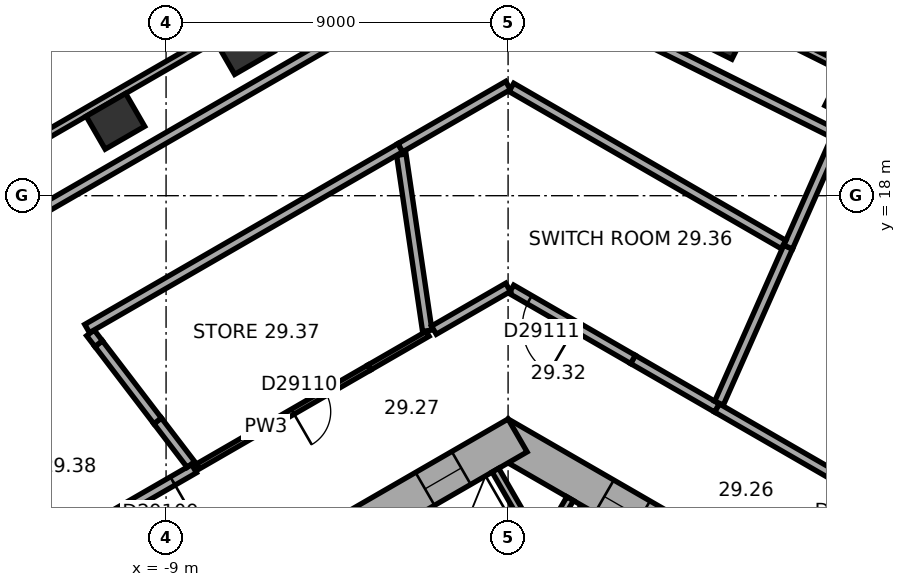
"""IFC4 building model, lengths in metres.
Left out: names, types, materials, properties, quantities, classifications, styles, units other than length and angle.
Written with IfcOpenShell. Run it as: python <this file> out.ifc"""

import sys

from ifc_helpers import new_model, si_unit, direction, frame, frame_2d, origin, origin_2d, place, context, subcontext, project, spatial, rectangle, extrude, element, fill, save


model = new_model("IFC4")
c1 = context("Model", 3, precision=1e-05, world=origin(), true_north=direction((0.0, 1.0)))
c2 = subcontext(c1, "Body", "Model", "MODEL_VIEW")
j1 = project(units=[si_unit("LENGTHUNIT", "METRE"), si_unit("PLANEANGLEUNIT", "RADIAN")], contexts=[c1])
p1 = place(None, origin())
s1 = spatial("IfcSite", under=j1, at=p1, CompositionType="ELEMENT")
p2 = place(p1, origin())
s2 = spatial("IfcBuilding", under=s1, at=p2, CompositionType="ELEMENT")
p3 = place(p2, frame((0.0, 0.0, 119.9)))
s3 = spatial("IfcBuildingStorey", under=s2, at=p3, CompositionType="ELEMENT", Elevation=119.9)
for number, where, z_axis, x_axis in (
    (1, (9.095, 20.551, 0.0), (0.0, 0.0, 1.0), (-0.895, 0.446, 0.0)),
    (2, (5.574, 22.306, 0.0), (0.0, 0.0, 1.0), (-0.895, 0.446, 0.0)),
    (3, (-6.926, 21.925, 0.0), (0.0, 0.0, 1.0), (-0.866, -0.5, 0.0)),
    (4, (-10.333, 19.957, 0.0), (0.0, 0.0, 1.0), (-0.866, -0.5, 0.0)),
):
    element("IfcColumn", number, at=place(p3, frame(where, z_axis=z_axis, x_axis=x_axis)), inside=s3, PredefinedType="COLUMN", context=c2, shape_type="SweptSolid", body=[
        extrude(rectangle(XDim=1.2, YDim=1.0, at=origin_2d()), origin(), (0.0, 0.0, 1.0), 4.5),
    ])
p4 = place(p3, frame((10.25, 5.629, 0.0), z_axis=(0.0, 0.0, 1.0), x_axis=(-0.866022616891, 0.50000482701, 0.0)))
e5 = element("IfcWall", 5, at=p4, inside=s3, PredefinedType="SHEAR", context=c2, shape_type="SweptSolid", body=[
    extrude(rectangle(XDim=12.125, YDim=1.0, at=frame_2d((6.062, 0.0))), origin(), (0.0, 0.0, 1.0), 4.5),
])
p5 = place(p4, frame((2.612, 0.0, 0.0)))
e6 = element("IfcOpeningElement", 6, at=p5, cuts=e5, PredefinedType="OPENING", context=c2, shape_type="SweptSolid", body=[
    extrude(rectangle(XDim=1.1, YDim=2.1, at=frame_2d((0.55, 1.05))), frame((0.0, 0.51, 0.0), z_axis=(0.0, -1.0, 0.0), x_axis=(1.0, 0.0, 0.0)), (0.0, 0.0, 1.0), 1.02),
])
p6 = place(p4, frame((5.212, 0.0, 0.0)))
e7 = element("IfcOpeningElement", 7, at=p6, cuts=e5, PredefinedType="OPENING", context=c2, shape_type="SweptSolid", body=[
    extrude(rectangle(XDim=1.1, YDim=2.1, at=frame_2d((0.55, 1.05))), frame((0.0, 0.51, 0.0), z_axis=(0.0, -1.0, 0.0), x_axis=(1.0, 0.0, 0.0)), (0.0, 0.0, 1.0), 1.02),
])
p7 = place(p4, frame((7.812, 0.0, 0.0)))
e8 = element("IfcOpeningElement", 8, at=p7, cuts=e5, PredefinedType="OPENING", context=c2, shape_type="SweptSolid", body=[
    extrude(rectangle(XDim=1.1, YDim=2.1, at=frame_2d((0.55, 1.05))), frame((0.0, 0.51, 0.0), z_axis=(0.0, -1.0, 0.0), x_axis=(1.0, 0.0, 0.0)), (0.0, 0.0, 1.0), 1.02),
])
p8 = place(p3, frame((0.25, 11.691, 0.0), z_axis=(0.0, 0.0, 1.0), x_axis=(-0.866022616891, -0.50000482701, 0.0)))
e9 = element("IfcWall", 9, at=p8, inside=s3, PredefinedType="SHEAR", context=c2, shape_type="SweptSolid", body=[
    extrude(rectangle(XDim=12.125, YDim=1.0, at=frame_2d((6.062, 0.0))), origin(), (0.0, 0.0, 1.0), 4.5),
])
p9 = place(p8, frame((6.262, 0.0, 0.0)))
e10 = element("IfcOpeningElement", 10, at=p9, cuts=e9, PredefinedType="OPENING", context=c2, shape_type="SweptSolid", body=[
    extrude(rectangle(XDim=1.5, YDim=2.1, at=frame_2d((0.75, 1.05))), frame((0.0, 0.51, 0.0), z_axis=(0.0, -1.0, 0.0), x_axis=(1.0, 0.0, 0.0)), (0.0, 0.0, 1.0), 1.02),
])
p10 = place(p8, frame((1.712, 0.0, 0.0)))
e11 = element("IfcOpeningElement", 11, at=p10, cuts=e9, PredefinedType="OPENING", context=c2, shape_type="SweptSolid", body=[
    extrude(rectangle(XDim=1.1, YDim=2.1, at=frame_2d((0.55, 1.05))), frame((0.0, 0.51, 0.0), z_axis=(0.0, -1.0, 0.0), x_axis=(1.0, 0.0, 0.0)), (0.0, 0.0, 1.0), 1.02),
])
p11 = place(p3, frame((20.63, 15.47, 0.0), z_axis=(0.0, 0.0, 1.0), x_axis=(-0.894934518609, 0.446197498203, 0.0)))
e12 = element("IfcWall", 12, at=p11, inside=s3, PredefinedType="STANDARD", context=c2, shape_type="SweptSolid", body=[
    extrude(rectangle(XDim=21.246, YDim=0.2, at=frame_2d((10.623, 0.0))), origin(), (0.0, 0.0, 1.0), 4.5),
])
p12 = place(p3, frame((-3.136, 24.805, 0.0), z_axis=(0.0, 0.0, 1.0), x_axis=(-0.866028291626, -0.499994998079, 0.0)))
e13 = element("IfcWall", 13, at=p12, inside=s3, PredefinedType="STANDARD", context=c2, shape_type="SweptSolid", body=[
    extrude(rectangle(XDim=21.246, YDim=0.2, at=frame_2d((10.623, 0.0))), origin(), (0.0, 0.0, 1.0), 4.5),
])
p13 = place(p3, frame((0.532, 8.122, 0.0), z_axis=(0.0, 0.0, 1.0), x_axis=(0.500077893725, 0.86598042715, 0.0)))
e14 = element("IfcWall", 14, at=p13, inside=s3, PredefinedType="PARTITIONING", context=c2, shape_type="SweptSolid", body=[
    extrude(rectangle(XDim=2.2, YDim=0.2, at=frame_2d((1.1, 0.0))), origin(), (0.0, 0.0, 1.0), 4.22),
])
p14 = place(p3, frame((0.767, 8.872, 0.0), z_axis=(0.0, 0.0, 1.0), x_axis=(-0.499994660107, 0.866028486751, 0.0)))
e15 = element("IfcWall", 15, at=p14, inside=s3, PredefinedType="PARTITIONING", context=c2, shape_type="SweptSolid", body=[
    extrude(rectangle(XDim=2.2, YDim=0.2, at=frame_2d((1.1, 0.0))), origin(), (0.0, 0.0, 1.0), 4.22),
])
p15 = place(p3, frame((10.186, 9.708, 0.0), z_axis=(0.0, 0.0, 1.0), x_axis=(-0.866018196172, 0.500012483742, 0.0)))
e16 = element("IfcWall", 16, at=p15, inside=s3, PredefinedType="SOLIDWALL", context=c2, shape_type="SweptSolid", body=[
    extrude(rectangle(XDim=5.416, YDim=0.25, at=frame_2d((2.708, 0.0))), origin(), (0.0, 0.0, 1.0), 4.22),
])
p16 = place(p15, frame((0.25, 0.0, 0.0)))
e17 = element("IfcOpeningElement", 17, at=p16, cuts=e16, PredefinedType="OPENING", context=c2, shape_type="SweptSolid", body=[
    extrude(rectangle(XDim=1.4, YDim=2.1, at=frame_2d((0.7, 1.05))), frame((0.0, 0.135, 0.0), z_axis=(0.0, -1.0, 0.0), x_axis=(1.0, 0.0, 0.0)), (0.0, 0.0, 1.0), 0.27),
])
p17 = place(p3, frame((-8.262, 10.818, 0.0), z_axis=(0.0, 0.0, 1.0), x_axis=(-0.866006491466, -0.500032755666, 0.0)))
e18 = element("IfcWall", 18, at=p17, inside=s3, PredefinedType="SOLIDWALL", context=c2, shape_type="SweptSolid", body=[
    extrude(rectangle(XDim=5.948, YDim=0.25, at=frame_2d((2.974, 0.0))), origin(), (0.0, 0.0, 1.0), 4.22),
])
p18 = place(p17, frame((0.65, 0.0, 0.0)))
e19 = element("IfcOpeningElement", 19, at=p18, cuts=e18, PredefinedType="OPENING", context=c2, shape_type="SweptSolid", body=[
    extrude(rectangle(XDim=1.4, YDim=2.1, at=frame_2d((0.7, 1.05))), frame((0.0, 0.135, 0.0), z_axis=(0.0, -1.0, 0.0), x_axis=(1.0, 0.0, 0.0)), (0.0, 0.0, 1.0), 0.27),
])
p19 = place(p3, frame((-8.159, 10.878, 0.0), z_axis=(0.0, 0.0, 1.0), x_axis=(0.866031891337, 0.499988763061, 0.0)))
e20 = element("IfcWall", 20, at=p19, inside=s3, PredefinedType="PARTITIONING", context=c2, shape_type="SweptSolid", body=[
    extrude(rectangle(XDim=4.126, YDim=0.15, at=frame_2d((2.063, 0.0))), origin(), (0.0, 0.0, 1.0), 4.22),
])
p20 = place(p19, frame((2.877, 0.0, 0.0)))
e21 = element("IfcOpeningElement", 21, at=p20, cuts=e20, PredefinedType="OPENING", context=c2, shape_type="SweptSolid", body=[
    extrude(rectangle(XDim=1.0, YDim=2.1, at=frame_2d((0.5, 1.05))), frame((0.0, 0.085, 0.0), z_axis=(0.0, -1.0, 0.0), x_axis=(1.0, 0.0, 0.0)), (0.0, 0.0, 1.0), 0.17),
])
p21 = place(p3, frame((-8.348, 10.929, 0.0), z_axis=(0.0, 0.0, 1.0), x_axis=(-0.606915548717, 0.794766328379, 0.0)))
e22 = element("IfcWall", 22, at=p21, inside=s3, PredefinedType="SOLIDWALL", context=c2, shape_type="SweptSolid", body=[
    extrude(rectangle(XDim=1.441, YDim=0.25, at=frame_2d((0.721, 0.0))), origin(), (0.0, 0.0, 1.0), 3.2),
])
p22 = place(p3, frame((-9.222, 12.075, 0.0), z_axis=(0.0, 0.0, 1.0), x_axis=(-0.607067159329, 0.794650529518, 0.0)))
e23 = element("IfcWall", 23, at=p22, inside=s3, PredefinedType="SOLIDWALL", context=c2, shape_type="SweptSolid", body=[
    extrude(rectangle(XDim=2.556, YDim=0.25, at=frame_2d((1.278, 0.0))), origin(), (0.0, 0.0, 1.0), 3.2),
])
p23 = place(p3, frame((5.495, 12.416, 0.0), z_axis=(0.0, 0.0, 1.0), x_axis=(-0.866043744811, 0.499968231064, 0.0)))
e24 = element("IfcWall", 24, at=p23, inside=s3, PredefinedType="SOLIDWALL", context=c2, shape_type="SweptSolid", body=[
    extrude(rectangle(XDim=2.551, YDim=0.25, at=frame_2d((1.275, 0.0))), origin(), (0.0, 0.0, 1.0), 4.22),
])
p24 = place(p3, frame((-4.585, 12.941, 0.0), z_axis=(0.0, 0.0, 1.0), x_axis=(0.866022692473, 0.500004696101, 0.0)))
e25 = element("IfcWall", 25, at=p24, inside=s3, PredefinedType="PARTITIONING", context=c2, shape_type="SweptSolid", body=[
    extrude(rectangle(XDim=1.073, YDim=0.15, at=frame_2d((0.537, 0.0))), origin(), (0.0, 0.0, 1.0), 4.22),
])
p25 = place(p3, frame((3.286, 13.691, 0.0), z_axis=(0.0, 0.0, 1.0), x_axis=(-0.866013897511, 0.50001992892, 0.0)))
e26 = element("IfcWall", 26, at=p25, inside=s3, PredefinedType="SOLIDWALL", context=c2, shape_type="SweptSolid", body=[
    extrude(rectangle(XDim=3.694, YDim=0.25, at=frame_2d((1.847, 0.0))), origin(), (0.0, 0.0, 1.0), 4.22),
])
p26 = place(p25, frame((1.744, 0.0, 0.0)))
e27 = element("IfcOpeningElement", 27, at=p26, cuts=e26, PredefinedType="OPENING", context=c2, shape_type="SweptSolid", body=[
    extrude(rectangle(XDim=1.4, YDim=2.1, at=frame_2d((0.7, 1.05))), frame((0.0, 0.135, 0.0), z_axis=(0.0, -1.0, 0.0), x_axis=(1.0, 0.0, 0.0)), (0.0, 0.0, 1.0), 0.27),
])
p27 = place(p3, frame((-2.115, 14.367, 0.0), z_axis=(0.0, 0.0, 1.0), x_axis=(-0.866020974757, -0.500007671222, 0.0)))
e28 = element("IfcWall", 28, at=p27, inside=s3, PredefinedType="PARTITIONING", context=c2, shape_type="SweptSolid", body=[
    extrude(rectangle(XDim=1.778, YDim=0.15, at=frame_2d((0.889, 0.0))), origin(), (0.0, 0.0, 1.0), 4.22),
])
p28 = place(p3, frame((-10.991, 14.391, 0.0), z_axis=(0.0, 0.0, 1.0), x_axis=(0.607070265523, -0.794648156556, 0.0)))
e29 = element("IfcWall", 29, at=p28, inside=s3, PredefinedType="SOLIDWALL", context=c2, shape_type="SweptSolid", body=[
    extrude(rectangle(XDim=0.358, YDim=0.25, at=frame_2d((0.179, 0.0))), origin(), (0.0, 0.0, 1.0), 4.22),
])
p29 = place(p3, frame((-2.127, 14.447, 0.0), z_axis=(0.0, 0.0, 1.0), x_axis=(-0.145734161627, 0.989323786298, 0.0)))
e30 = element("IfcWall", 30, at=p29, inside=s3, PredefinedType="SOLIDWALL", context=c2, shape_type="SweptSolid", body=[
    extrude(rectangle(XDim=4.682, YDim=0.25, at=frame_2d((2.341, 0.0))), origin(), (0.0, 0.0, 1.0), 3.2),
])
p30 = place(p3, frame((-1.952, 14.461, 0.0), z_axis=(0.0, 0.0, 1.0), x_axis=(0.866075582212, 0.499913078341, 0.0)))
e31 = element("IfcWall", 31, at=p30, inside=s3, PredefinedType="SOLIDWALL", context=c2, shape_type="SweptSolid", body=[
    extrude(rectangle(XDim=2.254, YDim=0.25, at=frame_2d((1.127, 0.0))), origin(), (0.0, 0.0, 1.0), 4.22),
])
p31 = place(p3, frame((-11.078, 14.504, 0.0), z_axis=(0.0, 0.0, 1.0), x_axis=(0.866009996143, 0.500026685868, 0.0)))
e32 = element("IfcWall", 32, at=p31, inside=s3, PredefinedType="SOLIDWALL", context=c2, shape_type="SweptSolid", body=[
    extrude(rectangle(XDim=9.517, YDim=0.25, at=frame_2d((4.758, 0.0))), origin(), (0.0, 0.0, 1.0), 4.22),
])
p32 = place(p3, frame((7.367, 16.646, 0.0), z_axis=(0.0, 0.0, 1.0), x_axis=(-0.404689706038, -0.914454067642, 0.0)))
e33 = element("IfcWall", 33, at=p32, inside=s3, PredefinedType="SOLIDWALL", context=c2, shape_type="SweptSolid", body=[
    extrude(rectangle(XDim=4.489, YDim=0.25, at=frame_2d((2.245, 0.0))), origin(), (0.0, 0.0, 1.0), 3.2),
])
p33 = place(p3, frame((7.37, 16.648, 0.0), z_axis=(0.0, 0.0, 1.0), x_axis=(0.404230252102, 0.914657260008, 0.0)))
e34 = element("IfcWall", 34, at=p33, inside=s3, PredefinedType="SOLIDWALL", context=c2, shape_type="SweptSolid", body=[
    extrude(rectangle(XDim=3.076, YDim=0.25, at=frame_2d((1.538, 0.0))), origin(), (0.0, 0.0, 1.0), 3.2),
])
p34 = place(p3, frame((-13.091, 17.158, 0.0), z_axis=(0.0, 0.0, 1.0), x_axis=(0.866014210799, 0.500019386319, 0.0)))
e35 = element("IfcWall", 35, at=p34, inside=s3, PredefinedType="SOLIDWALL", context=c2, shape_type="SweptSolid", body=[
    extrude(rectangle(XDim=12.052, YDim=0.25, at=frame_2d((6.026, 0.0))), origin(), (0.0, 0.0, 1.0), 3.72),
])
p35 = place(p3, frame((-2.837, 19.262, 0.0), z_axis=(0.0, 0.0, 1.0), x_axis=(0.866065190429, 0.499931081178, 0.0)))
e36 = element("IfcWall", 36, at=p35, inside=s3, PredefinedType="SOLIDWALL", context=c2, shape_type="SweptSolid", body=[
    extrude(rectangle(XDim=3.275, YDim=0.25, at=frame_2d((1.638, 0.0))), origin(), (0.0, 0.0, 1.0), 4.22),
])
p36 = place(p3, frame((0.087, 20.85, 0.0), z_axis=(0.0, 0.0, 1.0), x_axis=(0.86602280332, -0.500004504109, 0.0)))
e37 = element("IfcWall", 37, at=p36, inside=s3, PredefinedType="SOLIDWALL", context=c2, shape_type="SweptSolid", body=[
    extrude(rectangle(XDim=8.267, YDim=0.25, at=frame_2d((4.134, 0.0))), origin(), (0.0, 0.0, 1.0), 4.22),
])
p37 = place(p3, frame((1.233, 23.303, 0.0), z_axis=(0.0, 0.0, 1.0), x_axis=(0.894944104828, -0.446178270688, 0.0)))
e38 = element("IfcWall", 38, at=p37, inside=s3, PredefinedType="SOLIDWALL", context=c2, shape_type="SweptSolid", body=[
    extrude(rectangle(XDim=8.303, YDim=0.25, at=frame_2d((4.151, 0.0))), origin(), (0.0, 0.0, 1.0), 3.72),
])
p38 = place(p7, origin())
e39 = element("IfcDoor", 39, at=p38, inside=s3, OperationType="DOUBLE_DOOR_SLIDING", PredefinedType="DOOR", context=c2, shape_type="SweptSolid", body=[
    extrude(rectangle(XDim=1.1, YDim=2.1, at=frame_2d((0.55, 1.05))), frame((0.0, 0.025, 0.0), z_axis=(0.0, -1.0, 0.0), x_axis=(1.0, 0.0, 0.0)), (0.0, 0.0, 1.0), 0.05),
])
fill(e8, e39)
p39 = place(p10, origin())
e40 = element("IfcDoor", 40, at=p39, inside=s3, OperationType="DOUBLE_DOOR_SLIDING", PredefinedType="DOOR", context=c2, shape_type="SweptSolid", body=[
    extrude(rectangle(XDim=1.1, YDim=2.1, at=frame_2d((0.55, 1.05))), frame((0.0, 0.025, 0.0), z_axis=(0.0, -1.0, 0.0), x_axis=(1.0, 0.0, 0.0)), (0.0, 0.0, 1.0), 0.05),
])
fill(e11, e40)
p40 = place(p18, origin())
e41 = element("IfcDoor", 41, at=p40, inside=s3, OperationType="SINGLE_SWING_LEFT", PredefinedType="DOOR", context=c2, shape_type="SweptSolid", body=[
    extrude(rectangle(XDim=1.4, YDim=2.1, at=frame_2d((0.7, 1.05))), frame((0.0, 0.025, 0.0), z_axis=(0.0, -1.0, 0.0), x_axis=(1.0, 0.0, 0.0)), (0.0, 0.0, 1.0), 0.05),
])
fill(e19, e41)
p41 = place(p20, origin())
e42 = element("IfcDoor", 42, at=p41, inside=s3, OperationType="SINGLE_SWING_LEFT", PredefinedType="DOOR", context=c2, shape_type="SweptSolid", body=[
    extrude(rectangle(XDim=1.0, YDim=2.1, at=frame_2d((0.5, 1.05))), frame((0.0, 0.025, 0.0), z_axis=(0.0, -1.0, 0.0), x_axis=(1.0, 0.0, 0.0)), (0.0, 0.0, 1.0), 0.05),
])
fill(e21, e42)
p42 = place(p26, origin())
e43 = element("IfcDoor", 43, at=p42, inside=s3, OperationType="SINGLE_SWING_LEFT", PredefinedType="DOOR", context=c2, shape_type="SweptSolid", body=[
    extrude(rectangle(XDim=1.4, YDim=2.1, at=frame_2d((0.7, 1.05))), frame((0.0, 0.025, 0.0), z_axis=(0.0, -1.0, 0.0), x_axis=(1.0, 0.0, 0.0)), (0.0, 0.0, 1.0), 0.05),
])
fill(e27, e43)
save(model, sys.argv[1])
